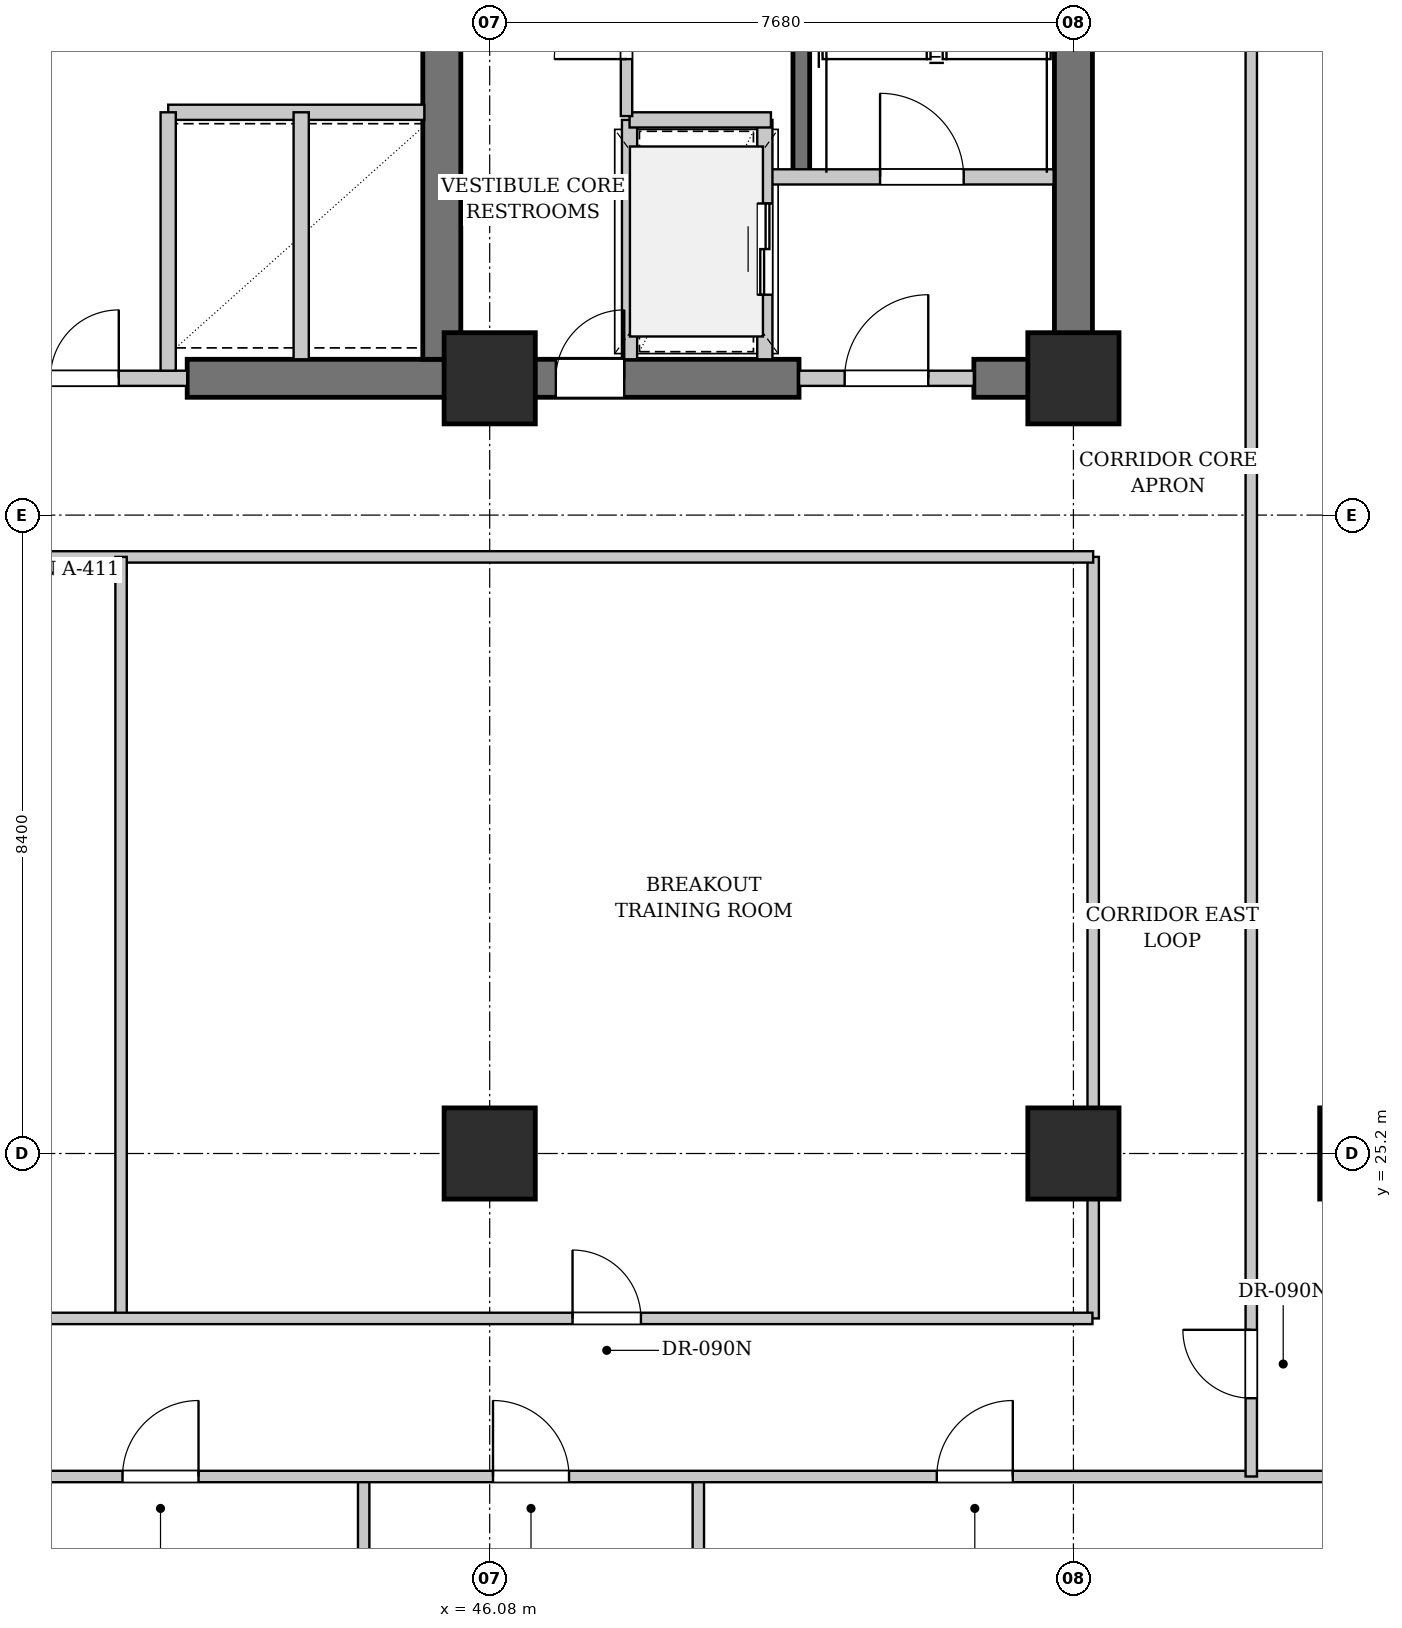
"""IFC4 building model, lengths in metres.
Left out: names, types, materials, properties, quantities, classifications, styles, units other than length and angle.
Written with IfcOpenShell. Run it as: python <this file> out.ifc"""

import sys

from ifc_helpers import new_model, si_unit, direction, frame, frame_2d, origin, origin_2d, place, context, subcontext, project, spatial, rectangle, extrude, element, fill, save


model = new_model("IFC4")
c1 = context("Model", 3, precision=1e-05, world=origin(), true_north=direction((0.0, 1.0)))
c2 = subcontext(c1, "Body", "Model", "MODEL_VIEW")
j1 = project(units=[si_unit("LENGTHUNIT", "METRE"), si_unit("PLANEANGLEUNIT", "RADIAN")], contexts=[c1])
p1 = place(None, origin())
s1 = spatial("IfcSite", under=j1, at=p1, CompositionType="ELEMENT")
p2 = place(p1, origin())
s2 = spatial("IfcBuilding", under=s1, at=p2, CompositionType="ELEMENT")
p3 = place(p2, frame((0.0, 0.0, 37.2)))
s3 = spatial("IfcBuildingStorey", under=s2, at=p3, CompositionType="ELEMENT", Elevation=37.2)
p4 = place(p3, frame((42.1, 35.4, 0.0), z_axis=(0.0, 0.0, 1.0), x_axis=(1.0, 0.0, 0.0)))
e1 = element("IfcWall", 1, at=p4, inside=s3, PredefinedType="SHEAR", context=c2, shape_type="SweptSolid", body=[
    extrude(rectangle(XDim=8.05, YDim=0.5, at=frame_2d((4.025, 0.0))), origin(), (0.0, 0.0, 1.0), 3.18),
])
p5 = place(p4, frame((4.85, 0.0, 0.0)))
e2 = element("IfcOpeningElement", 2, at=p5, cuts=e1, PredefinedType="OPENING", context=c2, shape_type="SweptSolid", body=[
    extrude(rectangle(XDim=0.9, YDim=2.15, at=frame_2d((0.45, 1.075))), frame((0.0, 0.26, 0.0), z_axis=(0.0, -1.0, 0.0), x_axis=(1.0, 0.0, 0.0)), (0.0, 0.0, 1.0), 0.52),
])
p6 = place(p3, frame((52.45, 35.4, 0.0), z_axis=(0.0, 0.0, 1.0), x_axis=(1.0, 0.0, 0.0)))
e3 = element("IfcWall", 3, at=p6, inside=s3, PredefinedType="SHEAR", context=c2, shape_type="SweptSolid", body=[
    extrude(rectangle(XDim=1.56, YDim=0.5, at=frame_2d((0.78, 0.0))), origin(), (0.0, 0.0, 1.0), 3.18),
])
for number, where, z_axis, x_axis in (
    (4, (45.45, 35.65, 0.0), (0.0, 0.0, 1.0), (0.0, 1.0, 0.0)),
    (5, (53.76, 35.65, 0.0), (0.0, 0.0, 1.0), (0.0, 1.0, 0.0)),
):
    element("IfcWall", number, at=place(p3, frame(where, z_axis=z_axis, x_axis=x_axis)), inside=s3, PredefinedType="SHEAR", context=c2, shape_type="SweptSolid", body=[
        extrude(rectangle(XDim=10.3, YDim=0.5, at=frame_2d((5.15, 0.0))), origin(), (0.0, 0.0, 1.0), 3.18),
    ])
p7 = place(p3, frame((50.18, 38.05, 0.0), z_axis=(0.0, 0.0, 1.0), x_axis=(0.0, 1.0, 0.0)))
e6 = element("IfcWall", 6, at=p7, inside=s3, PredefinedType="SHEAR", context=c2, shape_type="SweptSolid", body=[
    extrude(rectangle(XDim=7.9, YDim=0.22, at=frame_2d((3.95, 0.0))), origin(), (0.0, 0.0, 1.0), 3.18),
])
for number, where, z_axis, x_axis in (
    (7, (46.08, 35.4, 0.0), (0.0, 0.0, 1.0), (1.0, 0.0, 0.0)),
    (8, (46.08, 25.2, 0.0), (0.0, 0.0, 1.0), (1.0, 0.0, 0.0)),
    (9, (53.76, 35.4, 0.0), (0.0, 0.0, 1.0), (1.0, 0.0, 0.0)),
    (10, (53.76, 25.2, 0.0), (0.0, 0.0, 1.0), (1.0, 0.0, 0.0)),
    (11, (57.6, 25.2, 0.0), (0.0, 0.0, 1.0), (1.0, 0.0, 0.0)),
):
    element("IfcColumn", number, at=place(p3, frame(where, z_axis=z_axis, x_axis=x_axis)), inside=s3, PredefinedType="COLUMN", context=c2, shape_type="SweptSolid", body=[
        extrude(rectangle(XDim=1.2, YDim=1.2, at=origin_2d()), origin(), (0.0, 0.0, 1.0), 3.4),
    ])
p8 = place(p3, frame((35.6, 35.4, 0.0), z_axis=(0.0, 0.0, 1.0), x_axis=(1.0, 0.0, 0.0)))
e12 = element("IfcWall", 12, at=p8, inside=s3, PredefinedType="PARTITIONING", context=c2, shape_type="SweptSolid", body=[
    extrude(rectangle(XDim=6.5, YDim=0.2, at=frame_2d((3.25, 0.0))), origin(), (0.0, 0.0, 1.0), 2.475),
])
p9 = place(p8, frame((3.8, 0.0, 0.0)))
e13 = element("IfcOpeningElement", 13, at=p9, cuts=e12, PredefinedType="OPENING", context=c2, shape_type="SweptSolid", body=[
    extrude(rectangle(XDim=1.8, YDim=2.3, at=frame_2d((0.9, 1.15))), frame((0.0, 0.11, 0.0), z_axis=(0.0, -1.0, 0.0), x_axis=(1.0, 0.0, 0.0)), (0.0, 0.0, 1.0), 0.22),
])
p10 = place(p3, frame((41.85, 38.9, 0.0), z_axis=(0.0, 0.0, 1.0), x_axis=(1.0, 0.0, 0.0)))
e14 = element("IfcWall", 14, at=p10, inside=s3, PredefinedType="PARTITIONING", context=c2, shape_type="SweptSolid", body=[
    extrude(rectangle(XDim=3.37, YDim=0.2, at=frame_2d((1.685, 0.0))), origin(), (0.0, 0.0, 1.0), 3.18),
])
p11 = place(p3, frame((43.6, 35.65, 0.0), z_axis=(0.0, 0.0, 1.0), x_axis=(0.0, 1.0, 0.0)))
e15 = element("IfcWall", 15, at=p11, inside=s3, PredefinedType="PARTITIONING", context=c2, shape_type="SweptSolid", body=[
    extrude(rectangle(XDim=3.25, YDim=0.2, at=frame_2d((1.625, 0.0))), origin(), (0.0, 0.0, 1.0), 3.18),
])
p12 = place(p3, frame((41.85, 35.5, 0.0), z_axis=(0.0, 0.0, 1.0), x_axis=(0.0, 1.0, 0.0)))
e16 = element("IfcWall", 16, at=p12, inside=s3, PredefinedType="PARTITIONING", context=c2, shape_type="SweptSolid", body=[
    extrude(rectangle(XDim=3.4, YDim=0.2, at=frame_2d((1.7, 0.0))), origin(), (0.0, 0.0, 1.0), 3.18),
])
p13 = place(p3, frame((49.78, 38.05, 0.0), z_axis=(0.0, 0.0, 1.0), x_axis=(1.0, 0.0, 0.0)))
e17 = element("IfcWall", 17, at=p13, inside=s3, PredefinedType="PARTITIONING", context=c2, shape_type="SweptSolid", body=[
    extrude(rectangle(XDim=3.72, YDim=0.2, at=frame_2d((1.86, 0.0))), origin(), (0.0, 0.0, 1.0), 3.18),
])
p14 = place(p13, frame((1.436, 0.0, 0.0)))
e18 = element("IfcOpeningElement", 18, at=p14, cuts=e17, PredefinedType="OPENING", context=c2, shape_type="SweptSolid", body=[
    extrude(rectangle(XDim=1.1, YDim=2.15, at=frame_2d((0.55, 1.075))), frame((0.0, 0.11, 0.0), z_axis=(0.0, -1.0, 0.0), x_axis=(1.0, 0.0, 0.0)), (0.0, 0.0, 1.0), 0.22),
])
p15 = place(p3, frame((50.15, 35.4, 0.0), z_axis=(0.0, 0.0, 1.0), x_axis=(1.0, 0.0, 0.0)))
e19 = element("IfcWall", 19, at=p15, inside=s3, PredefinedType="PARTITIONING", context=c2, shape_type="SweptSolid", body=[
    extrude(rectangle(XDim=2.3, YDim=0.2, at=frame_2d((1.15, 0.0))), origin(), (0.0, 0.0, 1.0), 2.475),
])
p16 = place(p15, frame((0.6, 0.0, 0.0)))
e20 = element("IfcOpeningElement", 20, at=p16, cuts=e19, PredefinedType="OPENING", context=c2, shape_type="SweptSolid", body=[
    extrude(rectangle(XDim=1.1, YDim=2.15, at=frame_2d((0.55, 1.075))), frame((0.0, 0.11, 0.0), z_axis=(0.0, -1.0, 0.0), x_axis=(1.0, 0.0, 0.0)), (0.0, 0.0, 1.0), 0.22),
])
p17 = place(p3, frame((49.7, 35.65, 0.0), z_axis=(0.0, 0.0, 1.0), x_axis=(0.0, 1.0, 0.0)))
e21 = element("IfcWall", 21, at=p17, inside=s3, PredefinedType="PARTITIONING", context=c2, shape_type="SweptSolid", body=[
    extrude(rectangle(XDim=3.15, YDim=0.2, at=frame_2d((1.575, 0.0))), origin(), (0.0, 0.0, 1.0), 3.18),
])
p18 = place(p17, frame((0.85, 0.0, 0.0)))
e22 = element("IfcOpeningElement", 22, at=p18, cuts=e21, PredefinedType="OPENING", context=c2, shape_type="SweptSolid", body=[
    extrude(rectangle(XDim=1.2, YDim=2.2, at=frame_2d((0.6, 1.1))), frame((0.0, 0.11, 0.0), z_axis=(0.0, -1.0, 0.0), x_axis=(1.0, 0.0, 0.0)), (0.0, 0.0, 1.0), 0.22),
])
p19 = place(p3, frame((47.92, 35.65, 0.0), z_axis=(0.0, 0.0, 1.0), x_axis=(0.0, 1.0, 0.0)))
e23 = element("IfcWall", 23, at=p19, inside=s3, PredefinedType="PARTITIONING", context=c2, shape_type="SweptSolid", body=[
    extrude(rectangle(XDim=3.15, YDim=0.2, at=frame_2d((1.575, 0.0))), origin(), (0.0, 0.0, 1.0), 3.18),
])
p20 = place(p3, frame((47.92, 38.8, 0.0), z_axis=(0.0, 0.0, 1.0), x_axis=(1.0, 0.0, 0.0)))
e24 = element("IfcWall", 24, at=p20, inside=s3, PredefinedType="PARTITIONING", context=c2, shape_type="SweptSolid", body=[
    extrude(rectangle(XDim=1.86, YDim=0.2, at=frame_2d((0.93, 0.0))), origin(), (0.0, 0.0, 1.0), 3.18),
])
p21 = place(p3, frame((47.88, 38.85, 0.0), z_axis=(0.0, 0.0, 1.0), x_axis=(0.0, 1.0, 0.0)))
e25 = element("IfcWall", 25, at=p21, inside=s3, PredefinedType="PARTITIONING", context=c2, shape_type="SweptSolid", body=[
    extrude(rectangle(XDim=7.07, YDim=0.15, at=frame_2d((3.535, 0.0))), origin(), (0.0, 0.0, 1.0), 3.18),
])
p22 = place(p21, frame((0.75, 0.0, 0.0)))
e26 = element("IfcOpeningElement", 26, at=p22, cuts=e25, PredefinedType="OPENING", context=c2, shape_type="SweptSolid", body=[
    extrude(rectangle(XDim=0.95, YDim=2.15, at=frame_2d((0.475, 1.075))), frame((0.0, 0.085, 0.0), z_axis=(0.0, -1.0, 0.0), x_axis=(1.0, 0.0, 0.0)), (0.0, 0.0, 1.0), 0.17),
])
p23 = place(p21, frame((2.95, 0.0, 0.0)))
e27 = element("IfcOpeningElement", 27, at=p23, cuts=e25, PredefinedType="OPENING", context=c2, shape_type="SweptSolid", body=[
    extrude(rectangle(XDim=0.9, YDim=2.15, at=frame_2d((0.45, 1.075))), frame((0.0, 0.085, 0.0), z_axis=(0.0, -1.0, 0.0), x_axis=(1.0, 0.0, 0.0)), (0.0, 0.0, 1.0), 0.17),
])
for number, where, z_axis, x_axis in (
    (28, (44.422, 10.28, 0.0), (0.0, 0.0, 1.0), (0.0, 1.0, 0.0)),
    (29, (48.825, 10.28, 0.0), (0.0, 0.0, 1.0), (0.0, 1.0, 0.0)),
):
    element("IfcWall", number, at=place(p3, frame(where, z_axis=z_axis, x_axis=x_axis)), inside=s3, PredefinedType="PARTITIONING", context=c2, shape_type="SweptSolid", body=[
        extrude(rectangle(XDim=10.69, YDim=0.15, at=frame_2d((5.345, 0.0))), origin(), (0.0, 0.0, 1.0), 3.18),
    ])
p24 = place(p3, frame((6.08, 20.95, 0.0), z_axis=(0.0, 0.0, 1.0), x_axis=(1.0, 0.0, 0.0)))
e30 = element("IfcWall", 30, at=p24, inside=s3, PredefinedType="PARTITIONING", context=c2, shape_type="SweptSolid", body=[
    extrude(rectangle(XDim=64.64, YDim=0.15, at=frame_2d((32.32, 0.0))), origin(), (0.0, 0.0, 1.0), 3.18),
])
p25 = place(p24, frame((17.987, 0.0, 0.0)))
e31 = element("IfcOpeningElement", 31, at=p25, cuts=e30, PredefinedType="OPENING", context=c2, shape_type="SweptSolid", body=[
    extrude(rectangle(XDim=1.0, YDim=2.15, at=frame_2d((0.5, 1.075))), frame((0.0, 0.085, 0.0), z_axis=(0.0, -1.0, 0.0), x_axis=(1.0, 0.0, 0.0)), (0.0, 0.0, 1.0), 0.17),
])
p26 = place(p24, frame((24.477, 0.0, 0.0)))
e32 = element("IfcOpeningElement", 32, at=p26, cuts=e30, PredefinedType="OPENING", context=c2, shape_type="SweptSolid", body=[
    extrude(rectangle(XDim=1.0, YDim=2.15, at=frame_2d((0.5, 1.075))), frame((0.0, 0.085, 0.0), z_axis=(0.0, -1.0, 0.0), x_axis=(1.0, 0.0, 0.0)), (0.0, 0.0, 1.0), 0.17),
])
p27 = place(p24, frame((29.823, 0.0, 0.0)))
e33 = element("IfcOpeningElement", 33, at=p27, cuts=e30, PredefinedType="OPENING", context=c2, shape_type="SweptSolid", body=[
    extrude(rectangle(XDim=1.0, YDim=2.15, at=frame_2d((0.5, 1.075))), frame((0.0, 0.085, 0.0), z_axis=(0.0, -1.0, 0.0), x_axis=(1.0, 0.0, 0.0)), (0.0, 0.0, 1.0), 0.17),
])
p28 = place(p24, frame((35.169, 0.0, 0.0)))
e34 = element("IfcOpeningElement", 34, at=p28, cuts=e30, PredefinedType="OPENING", context=c2, shape_type="SweptSolid", body=[
    extrude(rectangle(XDim=1.0, YDim=2.15, at=frame_2d((0.5, 1.075))), frame((0.0, 0.085, 0.0), z_axis=(0.0, -1.0, 0.0), x_axis=(1.0, 0.0, 0.0)), (0.0, 0.0, 1.0), 0.17),
])
p29 = place(p24, frame((40.043, 0.0, 0.0)))
e35 = element("IfcOpeningElement", 35, at=p29, cuts=e30, PredefinedType="OPENING", context=c2, shape_type="SweptSolid", body=[
    extrude(rectangle(XDim=1.0, YDim=2.15, at=frame_2d((0.5, 1.075))), frame((0.0, 0.085, 0.0), z_axis=(0.0, -1.0, 0.0), x_axis=(1.0, 0.0, 0.0)), (0.0, 0.0, 1.0), 0.17),
])
p30 = place(p24, frame((45.883, 0.0, 0.0)))
e36 = element("IfcOpeningElement", 36, at=p30, cuts=e30, PredefinedType="OPENING", context=c2, shape_type="SweptSolid", body=[
    extrude(rectangle(XDim=1.0, YDim=2.15, at=frame_2d((0.5, 1.075))), frame((0.0, 0.085, 0.0), z_axis=(0.0, -1.0, 0.0), x_axis=(1.0, 0.0, 0.0)), (0.0, 0.0, 1.0), 0.17),
])
p31 = place(p3, frame((56.1, 20.95, 0.0), z_axis=(0.0, 0.0, 1.0), x_axis=(0.0, 1.0, 0.0)))
e37 = element("IfcWall", 37, at=p31, inside=s3, PredefinedType="PARTITIONING", context=c2, shape_type="SweptSolid", body=[
    extrude(rectangle(XDim=27.57, YDim=0.15, at=frame_2d((13.785, 0.0))), origin(), (0.0, 0.0, 1.0), 3.18),
])
p32 = place(p31, frame((1.03, 0.0, 0.0)))
e38 = element("IfcOpeningElement", 38, at=p32, cuts=e37, PredefinedType="OPENING", context=c2, shape_type="SweptSolid", body=[
    extrude(rectangle(XDim=0.9, YDim=2.15, at=frame_2d((0.45, 1.075))), frame((0.0, 0.085, 0.0), z_axis=(0.0, -1.0, 0.0), x_axis=(1.0, 0.0, 0.0)), (0.0, 0.0, 1.0), 0.17),
])
p33 = place(p3, frame((54.02, 23.03, 0.0), z_axis=(0.0, 0.0, 1.0), x_axis=(0.0, 1.0, 0.0)))
e39 = element("IfcWall", 39, at=p33, inside=s3, PredefinedType="PARTITIONING", context=c2, shape_type="SweptSolid", body=[
    extrude(rectangle(XDim=10.02, YDim=0.15, at=frame_2d((5.01, 0.0))), origin(), (0.0, 0.0, 1.0), 3.18),
])
p34 = place(p3, frame((22.83, 33.05, 0.0), z_axis=(0.0, 0.0, 1.0), x_axis=(1.0, 0.0, 0.0)))
e40 = element("IfcWall", 40, at=p34, inside=s3, PredefinedType="PARTITIONING", context=c2, shape_type="SweptSolid", body=[
    extrude(rectangle(XDim=31.19, YDim=0.15, at=frame_2d((15.595, 0.0))), origin(), (0.0, 0.0, 1.0), 3.18),
])
p35 = place(p3, frame((41.23, 23.03, 0.0), z_axis=(0.0, 0.0, 1.0), x_axis=(0.0, 1.0, 0.0)))
e41 = element("IfcWall", 41, at=p35, inside=s3, PredefinedType="PARTITIONING", context=c2, shape_type="SweptSolid", body=[
    extrude(rectangle(XDim=10.02, YDim=0.15, at=frame_2d((5.01, 0.0))), origin(), (0.0, 0.0, 1.0), 3.18),
])
p36 = place(p3, frame((22.84, 23.03, 0.0), z_axis=(0.0, 0.0, 1.0), x_axis=(1.0, 0.0, 0.0)))
e42 = element("IfcWall", 42, at=p36, inside=s3, PredefinedType="PARTITIONING", context=c2, shape_type="SweptSolid", body=[
    extrude(rectangle(XDim=31.17, YDim=0.15, at=frame_2d((15.585, 0.0))), origin(), (0.0, 0.0, 1.0), 3.18),
])
p37 = place(p36, frame((3.135, 0.0, 0.0)))
e43 = element("IfcOpeningElement", 43, at=p37, cuts=e42, PredefinedType="OPENING", context=c2, shape_type="SweptSolid", body=[
    extrude(rectangle(XDim=0.9, YDim=2.15, at=frame_2d((0.45, 1.075))), frame((0.0, 0.085, 0.0), z_axis=(0.0, -1.0, 0.0), x_axis=(1.0, 0.0, 0.0)), (0.0, 0.0, 1.0), 0.17),
])
p38 = place(p36, frame((12.33, 0.0, 0.0)))
e44 = element("IfcOpeningElement", 44, at=p38, cuts=e42, PredefinedType="OPENING", context=c2, shape_type="SweptSolid", body=[
    extrude(rectangle(XDim=0.9, YDim=2.15, at=frame_2d((0.45, 1.075))), frame((0.0, 0.085, 0.0), z_axis=(0.0, -1.0, 0.0), x_axis=(1.0, 0.0, 0.0)), (0.0, 0.0, 1.0), 0.17),
])
p39 = place(p36, frame((24.33, 0.0, 0.0)))
e45 = element("IfcOpeningElement", 45, at=p39, cuts=e42, PredefinedType="OPENING", context=c2, shape_type="SweptSolid", body=[
    extrude(rectangle(XDim=0.9, YDim=2.15, at=frame_2d((0.45, 1.075))), frame((0.0, 0.085, 0.0), z_axis=(0.0, -1.0, 0.0), x_axis=(1.0, 0.0, 0.0)), (0.0, 0.0, 1.0), 0.17),
])
p40 = place(p9, origin())
e46 = element("IfcDoor", 46, at=p40, inside=s3, OperationType="DOUBLE_DOOR_SINGLE_SWING", PredefinedType="DOOR", context=c2, shape_type="SweptSolid", body=[
    extrude(rectangle(XDim=1.8, YDim=2.3, at=frame_2d((0.9, 1.15))), frame((0.0, 0.025, 0.0), z_axis=(0.0, -1.0, 0.0), x_axis=(1.0, 0.0, 0.0)), (0.0, 0.0, 1.0), 0.05),
])
fill(e13, e46)
p41 = place(p14, origin())
e47 = element("IfcDoor", 47, at=p41, inside=s3, OperationType="SINGLE_SWING_LEFT", PredefinedType="DOOR", context=c2, shape_type="SweptSolid", body=[
    extrude(rectangle(XDim=1.1, YDim=2.15, at=frame_2d((0.55, 1.075))), frame((0.0, 0.025, 0.0), z_axis=(0.0, -1.0, 0.0), x_axis=(1.0, 0.0, 0.0)), (0.0, 0.0, 1.0), 0.05),
])
fill(e18, e47)
p42 = place(p16, origin())
e48 = element("IfcDoor", 48, at=p42, inside=s3, OperationType="SINGLE_SWING_RIGHT", PredefinedType="DOOR", context=c2, shape_type="SweptSolid", body=[
    extrude(rectangle(XDim=1.1, YDim=2.15, at=frame_2d((0.55, 1.075))), frame((0.0, 0.025, 0.0), z_axis=(0.0, -1.0, 0.0), x_axis=(1.0, 0.0, 0.0)), (0.0, 0.0, 1.0), 0.05),
])
fill(e20, e48)
p43 = place(p18, origin())
e49 = element("IfcDoor", 49, at=p43, inside=s3, OperationType="DOUBLE_DOOR_SLIDING", PredefinedType="DOOR", context=c2, shape_type="SweptSolid", body=[
    extrude(rectangle(XDim=1.2, YDim=2.2, at=frame_2d((0.6, 1.1))), frame((0.0, 0.025, 0.0), z_axis=(0.0, -1.0, 0.0), x_axis=(1.0, 0.0, 0.0)), (0.0, 0.0, 1.0), 0.05),
])
fill(e22, e49)
p44 = place(p22, origin())
e50 = element("IfcDoor", 50, at=p44, inside=s3, OperationType="SINGLE_SWING_LEFT", PredefinedType="DOOR", context=c2, shape_type="SweptSolid", body=[
    extrude(rectangle(XDim=0.95, YDim=2.15, at=frame_2d((0.475, 1.075))), frame((0.0, 0.025, 0.0), z_axis=(0.0, -1.0, 0.0), x_axis=(1.0, 0.0, 0.0)), (0.0, 0.0, 1.0), 0.05),
])
fill(e26, e50)
p45 = place(p28, origin())
e51 = element("IfcDoor", 51, at=p45, inside=s3, OperationType="SINGLE_SWING_RIGHT", PredefinedType="DOOR", context=c2, shape_type="SweptSolid", body=[
    extrude(rectangle(XDim=1.0, YDim=2.15, at=frame_2d((0.5, 1.075))), frame((0.0, 0.025, 0.0), z_axis=(0.0, -1.0, 0.0), x_axis=(1.0, 0.0, 0.0)), (0.0, 0.0, 1.0), 0.05),
])
fill(e34, e51)
p46 = place(p29, origin())
e52 = element("IfcDoor", 52, at=p46, inside=s3, OperationType="SINGLE_SWING_LEFT", PredefinedType="DOOR", context=c2, shape_type="SweptSolid", body=[
    extrude(rectangle(XDim=1.0, YDim=2.15, at=frame_2d((0.5, 1.075))), frame((0.0, 0.025, 0.0), z_axis=(0.0, -1.0, 0.0), x_axis=(1.0, 0.0, 0.0)), (0.0, 0.0, 1.0), 0.05),
])
fill(e35, e52)
p47 = place(p30, origin())
e53 = element("IfcDoor", 53, at=p47, inside=s3, OperationType="SINGLE_SWING_RIGHT", PredefinedType="DOOR", context=c2, shape_type="SweptSolid", body=[
    extrude(rectangle(XDim=1.0, YDim=2.15, at=frame_2d((0.5, 1.075))), frame((0.0, 0.025, 0.0), z_axis=(0.0, -1.0, 0.0), x_axis=(1.0, 0.0, 0.0)), (0.0, 0.0, 1.0), 0.05),
])
fill(e36, e53)
p48 = place(p32, origin())
e54 = element("IfcDoor", 54, at=p48, inside=s3, OperationType="SINGLE_SWING_RIGHT", PredefinedType="DOOR", context=c2, shape_type="SweptSolid", body=[
    extrude(rectangle(XDim=0.9, YDim=2.15, at=frame_2d((0.45, 1.075))), frame((0.0, 0.025, 0.0), z_axis=(0.0, -1.0, 0.0), x_axis=(1.0, 0.0, 0.0)), (0.0, 0.0, 1.0), 0.05),
])
fill(e38, e54)
p49 = place(p39, origin())
e55 = element("IfcDoor", 55, at=p49, inside=s3, OperationType="SINGLE_SWING_LEFT", PredefinedType="DOOR", context=c2, shape_type="SweptSolid", body=[
    extrude(rectangle(XDim=0.9, YDim=2.15, at=frame_2d((0.45, 1.075))), frame((0.0, 0.025, 0.0), z_axis=(0.0, -1.0, 0.0), x_axis=(1.0, 0.0, 0.0)), (0.0, 0.0, 1.0), 0.05),
])
fill(e45, e55)
p50 = place(p5, origin())
e56 = element("IfcDoor", 56, at=p50, inside=s3, OperationType="SINGLE_SWING_RIGHT", PredefinedType="DOOR", context=c2, shape_type="SweptSolid", body=[
    extrude(rectangle(XDim=0.9, YDim=2.15, at=frame_2d((0.45, 1.075))), frame((0.0, 0.025, 0.0), z_axis=(0.0, -1.0, 0.0), x_axis=(1.0, 0.0, 0.0)), (0.0, 0.0, 1.0), 0.05),
])
fill(e2, e56)
save(model, sys.argv[1])
